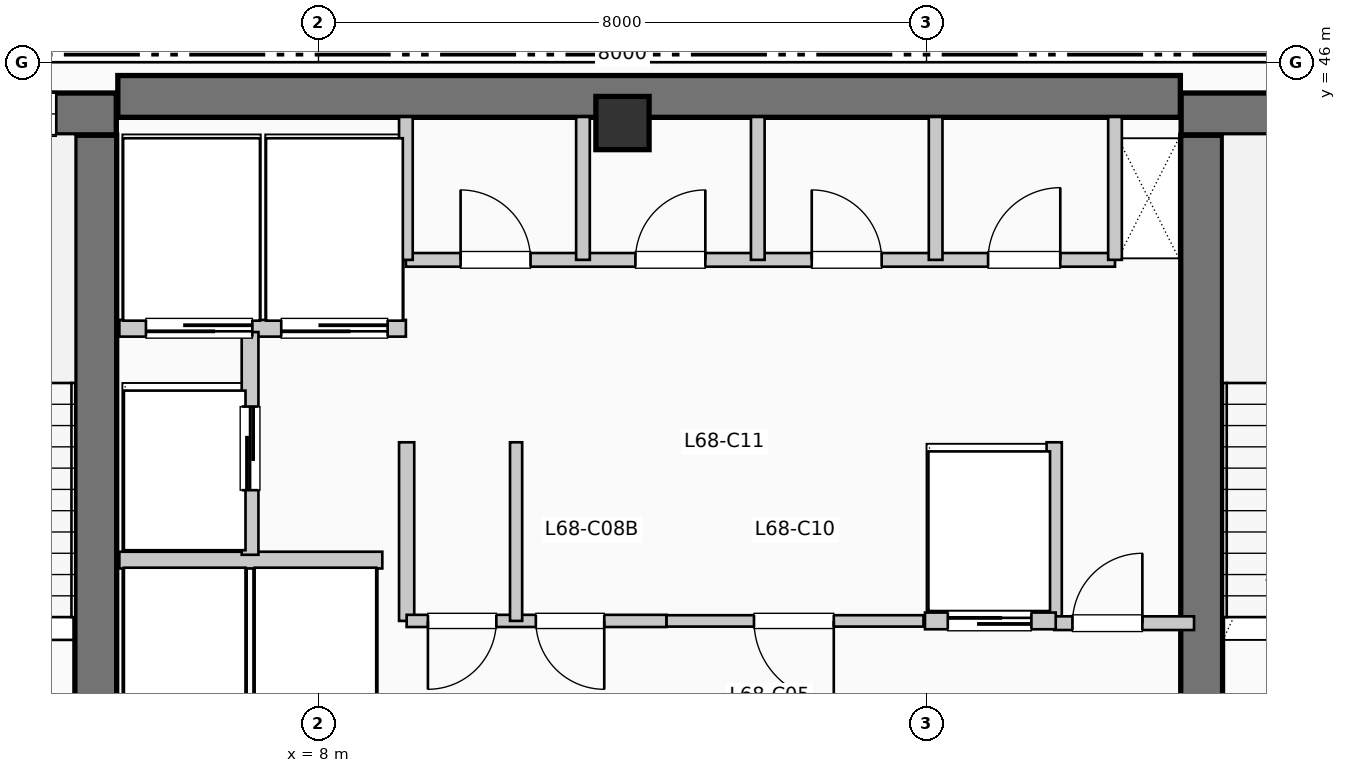
"""IFC4 building model, lengths in metres.
Left out: names, types, materials, properties, quantities, classifications, styles, units other than length and angle.
Written with IfcOpenShell. Run it as: python <this file> out.ifc"""

import sys

from ifc_helpers import new_model, si_unit, direction, frame, frame_2d, origin, origin_2d, place, context, subcontext, project, spatial, rectangle, extrude, element, fill, save


model = new_model("IFC4")
c1 = context("Model", 3, precision=1e-05, world=origin(), true_north=direction((0.0, 1.0)))
c2 = subcontext(c1, "Body", "Model", "MODEL_VIEW")
j1 = project(units=[si_unit("LENGTHUNIT", "METRE"), si_unit("PLANEANGLEUNIT", "RADIAN")], contexts=[c1])
p1 = place(None, origin())
s1 = spatial("IfcSite", under=j1, at=p1, CompositionType="ELEMENT")
p2 = place(p1, origin())
s2 = spatial("IfcBuilding", under=s1, at=p2, CompositionType="ELEMENT")
p3 = place(p2, frame((0.0, 0.0, 280.17)))
s3 = spatial("IfcBuildingStorey", under=s2, at=p3, CompositionType="ELEMENT", Elevation=280.17)
p4 = place(p3, frame((5.36, 45.55, 0.0), z_axis=(0.0, 0.0, 1.0), x_axis=(1.0, 0.0, 0.0)))
e1 = element("IfcWall", 1, at=p4, inside=s3, PredefinedType="SHEAR", context=c2, shape_type="SweptSolid", body=[
    extrude(rectangle(XDim=13.98, YDim=0.55, at=frame_2d((6.99, 0.0))), origin(), (0.0, 0.0, 1.0), 3.96),
])
p5 = place(p3, frame((5.07, 37.15, 0.0), z_axis=(0.0, 0.0, 1.0), x_axis=(0.0, 1.0, 0.0)))
e2 = element("IfcWall", 2, at=p5, inside=s3, PredefinedType="SHEAR", context=c2, shape_type="SweptSolid", body=[
    extrude(rectangle(XDim=7.89, YDim=0.55, at=frame_2d((3.945, 0.0))), origin(), (0.0, 0.0, 1.0), 3.96),
])
p6 = place(p3, frame((1.1, 45.32, 0.0), z_axis=(0.0, 0.0, 1.0), x_axis=(1.0, 0.0, 0.0)))
e3 = element("IfcWall", 3, at=p6, inside=s3, PredefinedType="SHEAR", context=c2, shape_type="SweptSolid", body=[
    extrude(rectangle(XDim=4.24, YDim=0.55, at=frame_2d((2.12, 0.0))), origin(), (0.0, 0.0, 1.0), 3.96),
])
p7 = place(p6, frame((2.05, 0.0, 1.05)))
e4 = element("IfcOpeningElement", 4, at=p7, cuts=e3, PredefinedType="OPENING", context=c2, shape_type="SweptSolid", body=[
    extrude(rectangle(XDim=1.4, YDim=1.8, at=frame_2d((0.7, 0.9))), frame((0.0, 0.285, 0.0), z_axis=(0.0, -1.0, 0.0), x_axis=(1.0, 0.0, 0.0)), (0.0, 0.0, 1.0), 0.57),
])
p8 = place(p3, frame((19.62, 37.15, 0.0), z_axis=(0.0, 0.0, 1.0), x_axis=(0.0, 1.0, 0.0)))
e5 = element("IfcWall", 5, at=p8, inside=s3, PredefinedType="SHEAR", context=c2, shape_type="SweptSolid", body=[
    extrude(rectangle(XDim=7.89, YDim=0.55, at=frame_2d((3.945, 0.0))), origin(), (0.0, 0.0, 1.0), 3.96),
])
p9 = place(p3, frame((19.35, 45.32, 0.0), z_axis=(0.0, 0.0, 1.0), x_axis=(1.0, 0.0, 0.0)))
e6 = element("IfcWall", 6, at=p9, inside=s3, PredefinedType="SHEAR", context=c2, shape_type="SweptSolid", body=[
    extrude(rectangle(XDim=3.69, YDim=0.55, at=frame_2d((1.845, 0.0))), origin(), (0.0, 0.0, 1.0), 3.96),
])
p10 = place(p9, frame((1.15, 0.0, 1.05)))
e7 = element("IfcOpeningElement", 7, at=p10, cuts=e6, PredefinedType="OPENING", context=c2, shape_type="SweptSolid", body=[
    extrude(rectangle(XDim=1.4, YDim=1.8, at=frame_2d((0.7, 0.9))), frame((0.0, 0.285, 0.0), z_axis=(0.0, -1.0, 0.0), x_axis=(1.0, 0.0, 0.0)), (0.0, 0.0, 1.0), 0.57),
])
p11 = place(p3, frame((12.0, 45.2, 0.0), z_axis=(0.0, 0.0, 1.0), x_axis=(1.0, 0.0, 0.0)))
e8 = element("IfcColumn", 8, at=p11, inside=s3, PredefinedType="COLUMN", context=c2, shape_type="SweptSolid", body=[
    extrude(rectangle(XDim=0.7, YDim=0.7, at=origin_2d()), origin(), (0.0, 0.0, 1.0), 3.96),
])
p12 = place(p3, frame((5.38, 39.45, 0.0), z_axis=(0.0, 0.0, 1.0), x_axis=(1.0, 0.0, 0.0)))
e9 = element("IfcWall", 9, at=p12, inside=s3, PredefinedType="PARTITIONING", context=c2, shape_type="SweptSolid", body=[
    extrude(rectangle(XDim=3.46, YDim=0.22, at=frame_2d((1.73, 0.0))), origin(), (0.0, 0.0, 1.0), 3.74),
])
p13 = place(p3, frame((5.38, 42.5, 0.0), z_axis=(0.0, 0.0, 1.0), x_axis=(1.0, 0.0, 0.0)))
e10 = element("IfcWall", 10, at=p13, inside=s3, PredefinedType="PARTITIONING", context=c2, shape_type="SweptSolid", body=[
    extrude(rectangle(XDim=3.77, YDim=0.22, at=frame_2d((1.885, 0.0))), origin(), (0.0, 0.0, 1.0), 3.74),
])
p14 = place(p13, frame((1.75, 0.0, 0.0), z_axis=(0.0, 0.0, 1.0), x_axis=(-1.0, 0.0, 0.0)))
e11 = element("IfcOpeningElement", 11, at=p14, cuts=e10, PredefinedType="OPENING", context=c2, shape_type="SweptSolid", body=[
    extrude(rectangle(XDim=1.4, YDim=2.2, at=frame_2d((0.7, 1.1))), frame((0.0, 0.12, 0.0), z_axis=(0.0, -1.0, 0.0), x_axis=(1.0, 0.0, 0.0)), (0.0, 0.0, 1.0), 0.24),
])
p15 = place(p13, frame((3.53, 0.0, 0.0), z_axis=(0.0, 0.0, 1.0), x_axis=(-1.0, 0.0, 0.0)))
e12 = element("IfcOpeningElement", 12, at=p15, cuts=e10, PredefinedType="OPENING", context=c2, shape_type="SweptSolid", body=[
    extrude(rectangle(XDim=1.4, YDim=2.2, at=frame_2d((0.7, 1.1))), frame((0.0, 0.12, 0.0), z_axis=(0.0, -1.0, 0.0), x_axis=(1.0, 0.0, 0.0)), (0.0, 0.0, 1.0), 0.24),
])
p16 = place(p3, frame((7.1, 39.52, 0.0), z_axis=(0.0, 0.0, 1.0), x_axis=(0.0, 1.0, 0.0)))
e13 = element("IfcWall", 13, at=p16, inside=s3, PredefinedType="PARTITIONING", context=c2, shape_type="SweptSolid", body=[
    extrude(rectangle(XDim=2.93, YDim=0.22, at=frame_2d((1.465, 0.0))), origin(), (0.0, 0.0, 1.0), 3.74),
])
p17 = place(p16, frame((0.85, 0.0, 0.0)))
e14 = element("IfcOpeningElement", 14, at=p17, cuts=e13, PredefinedType="OPENING", context=c2, shape_type="SweptSolid", body=[
    extrude(rectangle(XDim=1.1, YDim=2.2, at=frame_2d((0.55, 1.1))), frame((0.0, 0.12, 0.0), z_axis=(0.0, -1.0, 0.0), x_axis=(1.0, 0.0, 0.0)), (0.0, 0.0, 1.0), 0.24),
])
for number, where, z_axis, x_axis in (
    (15, (9.16, 38.65, 0.0), (0.0, 0.0, 1.0), (0.0, 1.0, 0.0)),
    (16, (17.68, 38.65, 0.0), (0.0, 0.0, 1.0), (0.0, 1.0, 0.0)),
):
    element("IfcWall", number, at=place(p3, frame(where, z_axis=z_axis, x_axis=x_axis)), inside=s3, PredefinedType="PARTITIONING", context=c2, shape_type="SweptSolid", body=[
        extrude(rectangle(XDim=2.35, YDim=0.2, at=frame_2d((1.175, 0.0))), origin(), (0.0, 0.0, 1.0), 3.74),
    ])
p18 = place(p3, frame((17.68, 38.62, 0.0), z_axis=(0.0, 0.0, 1.0), x_axis=(1.0, 0.0, 0.0)))
e17 = element("IfcWall", 17, at=p18, inside=s3, PredefinedType="PARTITIONING", context=c2, shape_type="SweptSolid", body=[
    extrude(rectangle(XDim=1.84, YDim=0.18, at=frame_2d((0.92, 0.0))), origin(), (0.0, 0.0, 1.0), 3.74),
])
p19 = place(p18, frame((0.24, 0.0, 0.0)))
e18 = element("IfcOpeningElement", 18, at=p19, cuts=e17, PredefinedType="OPENING", context=c2, shape_type="SweptSolid", body=[
    extrude(rectangle(XDim=0.92, YDim=2.1, at=frame_2d((0.46, 1.05))), frame((0.0, 0.1, 0.0), z_axis=(0.0, -1.0, 0.0), x_axis=(1.0, 0.0, 0.0)), (0.0, 0.0, 1.0), 0.2),
])
p20 = place(p3, frame((9.16, 38.65, 0.0), z_axis=(0.0, 0.0, 1.0), x_axis=(1.0, 0.0, 0.0)))
e19 = element("IfcWall", 19, at=p20, inside=s3, PredefinedType="PARTITIONING", context=c2, shape_type="SweptSolid", body=[
    extrude(rectangle(XDim=3.42, YDim=0.16, at=frame_2d((1.71, 0.0))), origin(), (0.0, 0.0, 1.0), 3.74),
])
p21 = place(p20, frame((1.18, 0.0, 0.0), z_axis=(0.0, 0.0, 1.0), x_axis=(-1.0, 0.0, 0.0)))
e20 = element("IfcOpeningElement", 20, at=p21, cuts=e19, PredefinedType="OPENING", context=c2, shape_type="SweptSolid", body=[
    extrude(rectangle(XDim=0.9, YDim=2.15, at=frame_2d((0.45, 1.075))), frame((0.0, 0.09, 0.0), z_axis=(0.0, -1.0, 0.0), x_axis=(1.0, 0.0, 0.0)), (0.0, 0.0, 1.0), 0.18),
])
p22 = place(p20, frame((2.6, 0.0, 0.0), z_axis=(0.0, 0.0, 1.0), x_axis=(-1.0, 0.0, 0.0)))
e21 = element("IfcOpeningElement", 21, at=p22, cuts=e19, PredefinedType="OPENING", context=c2, shape_type="SweptSolid", body=[
    extrude(rectangle(XDim=0.9, YDim=2.15, at=frame_2d((0.45, 1.075))), frame((0.0, 0.09, 0.0), z_axis=(0.0, -1.0, 0.0), x_axis=(1.0, 0.0, 0.0)), (0.0, 0.0, 1.0), 0.18),
])
p23 = place(p3, frame((10.6, 38.65, 0.0), z_axis=(0.0, 0.0, 1.0), x_axis=(0.0, 1.0, 0.0)))
e22 = element("IfcWall", 22, at=p23, inside=s3, PredefinedType="PARTITIONING", context=c2, shape_type="SweptSolid", body=[
    extrude(rectangle(XDim=2.35, YDim=0.16, at=frame_2d((1.175, 0.0))), origin(), (0.0, 0.0, 1.0), 3.74),
])
p24 = place(p3, frame((12.58, 38.65, 0.0), z_axis=(0.0, 0.0, 1.0), x_axis=(1.0, 0.0, 0.0)))
e23 = element("IfcWall", 23, at=p24, inside=s3, PredefinedType="PARTITIONING", context=c2, shape_type="SweptSolid", body=[
    extrude(rectangle(XDim=3.38, YDim=0.15, at=frame_2d((1.69, 0.0))), origin(), (0.0, 0.0, 1.0), 3.74),
])
p25 = place(p24, frame((2.2, 0.0, 0.0), z_axis=(0.0, 0.0, 1.0), x_axis=(-1.0, 0.0, 0.0)))
e24 = element("IfcOpeningElement", 24, at=p25, cuts=e23, PredefinedType="OPENING", context=c2, shape_type="SweptSolid", body=[
    extrude(rectangle(XDim=1.05, YDim=2.15, at=frame_2d((0.525, 1.075))), frame((0.0, 0.085, 0.0), z_axis=(0.0, -1.0, 0.0), x_axis=(1.0, 0.0, 0.0)), (0.0, 0.0, 1.0), 0.17),
])
p26 = place(p3, frame((15.98, 38.65, 0.0), z_axis=(0.0, 0.0, 1.0), x_axis=(1.0, 0.0, 0.0)))
e25 = element("IfcWall", 25, at=p26, inside=s3, PredefinedType="PARTITIONING", context=c2, shape_type="SweptSolid", body=[
    extrude(rectangle(XDim=1.72, YDim=0.22, at=frame_2d((0.86, 0.0))), origin(), (0.0, 0.0, 1.0), 3.74),
])
p27 = place(p26, frame((0.3, 0.0, 0.0)))
e26 = element("IfcOpeningElement", 26, at=p27, cuts=e25, PredefinedType="OPENING", context=c2, shape_type="SweptSolid", body=[
    extrude(rectangle(XDim=1.1, YDim=2.2, at=frame_2d((0.55, 1.1))), frame((0.0, 0.12, 0.0), z_axis=(0.0, -1.0, 0.0), x_axis=(1.0, 0.0, 0.0)), (0.0, 0.0, 1.0), 0.24),
])
p28 = place(p3, frame((9.15, 43.4, 0.0), z_axis=(0.0, 0.0, 1.0), x_axis=(1.0, 0.0, 0.0)))
e27 = element("IfcWall", 27, at=p28, inside=s3, PredefinedType="PLUMBINGWALL", context=c2, shape_type="SweptSolid", body=[
    extrude(rectangle(XDim=9.33, YDim=0.18, at=frame_2d((4.665, 0.0))), origin(), (0.0, 0.0, 1.0), 3.74),
])
p29 = place(p28, frame((0.72, 0.0, 0.0)))
e28 = element("IfcOpeningElement", 28, at=p29, cuts=e27, PredefinedType="OPENING", context=c2, shape_type="SweptSolid", body=[
    extrude(rectangle(XDim=0.92, YDim=2.1, at=frame_2d((0.46, 1.05))), frame((0.0, 0.1, 0.0), z_axis=(0.0, -1.0, 0.0), x_axis=(1.0, 0.0, 0.0)), (0.0, 0.0, 1.0), 0.2),
])
p30 = place(p28, frame((3.02, 0.0, 0.0)))
e29 = element("IfcOpeningElement", 29, at=p30, cuts=e27, PredefinedType="OPENING", context=c2, shape_type="SweptSolid", body=[
    extrude(rectangle(XDim=0.92, YDim=2.1, at=frame_2d((0.46, 1.05))), frame((0.0, 0.1, 0.0), z_axis=(0.0, -1.0, 0.0), x_axis=(1.0, 0.0, 0.0)), (0.0, 0.0, 1.0), 0.2),
])
p31 = place(p28, frame((5.34, 0.0, 0.0)))
e30 = element("IfcOpeningElement", 30, at=p31, cuts=e27, PredefinedType="OPENING", context=c2, shape_type="SweptSolid", body=[
    extrude(rectangle(XDim=0.92, YDim=2.1, at=frame_2d((0.46, 1.05))), frame((0.0, 0.1, 0.0), z_axis=(0.0, -1.0, 0.0), x_axis=(1.0, 0.0, 0.0)), (0.0, 0.0, 1.0), 0.2),
])
p32 = place(p28, frame((7.66, 0.0, 0.0)))
e31 = element("IfcOpeningElement", 31, at=p32, cuts=e27, PredefinedType="OPENING", context=c2, shape_type="SweptSolid", body=[
    extrude(rectangle(XDim=0.95, YDim=2.1, at=frame_2d((0.475, 1.05))), frame((0.0, 0.1, 0.0), z_axis=(0.0, -1.0, 0.0), x_axis=(1.0, 0.0, 0.0)), (0.0, 0.0, 1.0), 0.2),
])
for number, where, z_axis, x_axis in (
    (32, (9.15, 43.4, 0.0), (0.0, 0.0, 1.0), (0.0, 1.0, 0.0)),
    (33, (18.48, 43.4, 0.0), (0.0, 0.0, 1.0), (0.0, 1.0, 0.0)),
    (34, (11.48, 43.4, 0.0), (0.0, 0.0, 1.0), (0.0, 1.0, 0.0)),
    (35, (13.78, 43.4, 0.0), (0.0, 0.0, 1.0), (0.0, 1.0, 0.0)),
    (36, (16.12, 43.4, 0.0), (0.0, 0.0, 1.0), (0.0, 1.0, 0.0)),
):
    element("IfcWall", number, at=place(p3, frame(where, z_axis=z_axis, x_axis=x_axis)), inside=s3, PredefinedType="PLUMBINGWALL", context=c2, shape_type="SweptSolid", body=[
        extrude(rectangle(XDim=1.88, YDim=0.18, at=frame_2d((0.94, 0.0))), origin(), (0.0, 0.0, 1.0), 3.74),
    ])
p33 = place(p7, origin())
e37 = element("IfcWindow", 37, at=p33, inside=s3, PartitioningType="SINGLE_PANEL", PredefinedType="WINDOW", context=c2, shape_type="SweptSolid", body=[
    extrude(rectangle(XDim=1.4, YDim=1.8, at=frame_2d((0.7, 0.9))), frame((0.0, 0.03, 0.0), z_axis=(0.0, -1.0, 0.0), x_axis=(1.0, 0.0, 0.0)), (0.0, 0.0, 1.0), 0.06),
])
fill(e4, e37)
p34 = place(p14, origin())
e38 = element("IfcDoor", 38, at=p34, inside=s3, OperationType="SLIDING_TO_LEFT", PredefinedType="DOOR", context=c2, shape_type="SweptSolid", body=[
    extrude(rectangle(XDim=1.4, YDim=2.2, at=frame_2d((0.7, 1.1))), frame((0.0, 0.025, 0.0), z_axis=(0.0, -1.0, 0.0), x_axis=(1.0, 0.0, 0.0)), (0.0, 0.0, 1.0), 0.05),
])
fill(e11, e38)
p35 = place(p15, origin())
e39 = element("IfcDoor", 39, at=p35, inside=s3, OperationType="SLIDING_TO_LEFT", PredefinedType="DOOR", context=c2, shape_type="SweptSolid", body=[
    extrude(rectangle(XDim=1.4, YDim=2.2, at=frame_2d((0.7, 1.1))), frame((0.0, 0.025, 0.0), z_axis=(0.0, -1.0, 0.0), x_axis=(1.0, 0.0, 0.0)), (0.0, 0.0, 1.0), 0.05),
])
fill(e12, e39)
p36 = place(p17, origin())
e40 = element("IfcDoor", 40, at=p36, inside=s3, OperationType="SLIDING_TO_LEFT", PredefinedType="DOOR", context=c2, shape_type="SweptSolid", body=[
    extrude(rectangle(XDim=1.1, YDim=2.2, at=frame_2d((0.55, 1.1))), frame((0.0, 0.025, 0.0), z_axis=(0.0, -1.0, 0.0), x_axis=(1.0, 0.0, 0.0)), (0.0, 0.0, 1.0), 0.05),
])
fill(e14, e40)
p37 = place(p19, origin())
e41 = element("IfcDoor", 41, at=p37, inside=s3, OperationType="SINGLE_SWING_RIGHT", PredefinedType="DOOR", context=c2, shape_type="SweptSolid", body=[
    extrude(rectangle(XDim=0.92, YDim=2.1, at=frame_2d((0.46, 1.05))), frame((0.0, 0.025, 0.0), z_axis=(0.0, -1.0, 0.0), x_axis=(1.0, 0.0, 0.0)), (0.0, 0.0, 1.0), 0.05),
])
fill(e18, e41)
p38 = place(p21, origin())
e42 = element("IfcDoor", 42, at=p38, inside=s3, OperationType="SINGLE_SWING_LEFT", PredefinedType="DOOR", context=c2, shape_type="SweptSolid", body=[
    extrude(rectangle(XDim=0.9, YDim=2.15, at=frame_2d((0.45, 1.075))), frame((0.0, 0.025, 0.0), z_axis=(0.0, -1.0, 0.0), x_axis=(1.0, 0.0, 0.0)), (0.0, 0.0, 1.0), 0.05),
])
fill(e20, e42)
p39 = place(p22, origin())
e43 = element("IfcDoor", 43, at=p39, inside=s3, OperationType="SINGLE_SWING_RIGHT", PredefinedType="DOOR", context=c2, shape_type="SweptSolid", body=[
    extrude(rectangle(XDim=0.9, YDim=2.15, at=frame_2d((0.45, 1.075))), frame((0.0, 0.025, 0.0), z_axis=(0.0, -1.0, 0.0), x_axis=(1.0, 0.0, 0.0)), (0.0, 0.0, 1.0), 0.05),
])
fill(e21, e43)
p40 = place(p25, origin())
e44 = element("IfcDoor", 44, at=p40, inside=s3, OperationType="SINGLE_SWING_RIGHT", PredefinedType="DOOR", context=c2, shape_type="SweptSolid", body=[
    extrude(rectangle(XDim=1.05, YDim=2.15, at=frame_2d((0.525, 1.075))), frame((0.0, 0.025, 0.0), z_axis=(0.0, -1.0, 0.0), x_axis=(1.0, 0.0, 0.0)), (0.0, 0.0, 1.0), 0.05),
])
fill(e24, e44)
p41 = place(p27, origin())
e45 = element("IfcDoor", 45, at=p41, inside=s3, OperationType="SLIDING_TO_LEFT", PredefinedType="DOOR", context=c2, shape_type="SweptSolid", body=[
    extrude(rectangle(XDim=1.1, YDim=2.2, at=frame_2d((0.55, 1.1))), frame((0.0, 0.025, 0.0), z_axis=(0.0, -1.0, 0.0), x_axis=(1.0, 0.0, 0.0)), (0.0, 0.0, 1.0), 0.05),
])
fill(e26, e45)
p42 = place(p29, origin())
e46 = element("IfcDoor", 46, at=p42, inside=s3, OperationType="SINGLE_SWING_LEFT", PredefinedType="DOOR", context=c2, shape_type="SweptSolid", body=[
    extrude(rectangle(XDim=0.92, YDim=2.1, at=frame_2d((0.46, 1.05))), frame((0.0, 0.025, 0.0), z_axis=(0.0, -1.0, 0.0), x_axis=(1.0, 0.0, 0.0)), (0.0, 0.0, 1.0), 0.05),
])
fill(e28, e46)
p43 = place(p30, origin())
e47 = element("IfcDoor", 47, at=p43, inside=s3, OperationType="SINGLE_SWING_RIGHT", PredefinedType="DOOR", context=c2, shape_type="SweptSolid", body=[
    extrude(rectangle(XDim=0.92, YDim=2.1, at=frame_2d((0.46, 1.05))), frame((0.0, 0.025, 0.0), z_axis=(0.0, -1.0, 0.0), x_axis=(1.0, 0.0, 0.0)), (0.0, 0.0, 1.0), 0.05),
])
fill(e29, e47)
p44 = place(p31, origin())
e48 = element("IfcDoor", 48, at=p44, inside=s3, OperationType="SINGLE_SWING_LEFT", PredefinedType="DOOR", context=c2, shape_type="SweptSolid", body=[
    extrude(rectangle(XDim=0.92, YDim=2.1, at=frame_2d((0.46, 1.05))), frame((0.0, 0.025, 0.0), z_axis=(0.0, -1.0, 0.0), x_axis=(1.0, 0.0, 0.0)), (0.0, 0.0, 1.0), 0.05),
])
fill(e30, e48)
p45 = place(p32, origin())
e49 = element("IfcDoor", 49, at=p45, inside=s3, OperationType="SINGLE_SWING_RIGHT", PredefinedType="DOOR", context=c2, shape_type="SweptSolid", body=[
    extrude(rectangle(XDim=0.95, YDim=2.1, at=frame_2d((0.475, 1.05))), frame((0.0, 0.025, 0.0), z_axis=(0.0, -1.0, 0.0), x_axis=(1.0, 0.0, 0.0)), (0.0, 0.0, 1.0), 0.05),
])
fill(e31, e49)
save(model, sys.argv[1])
